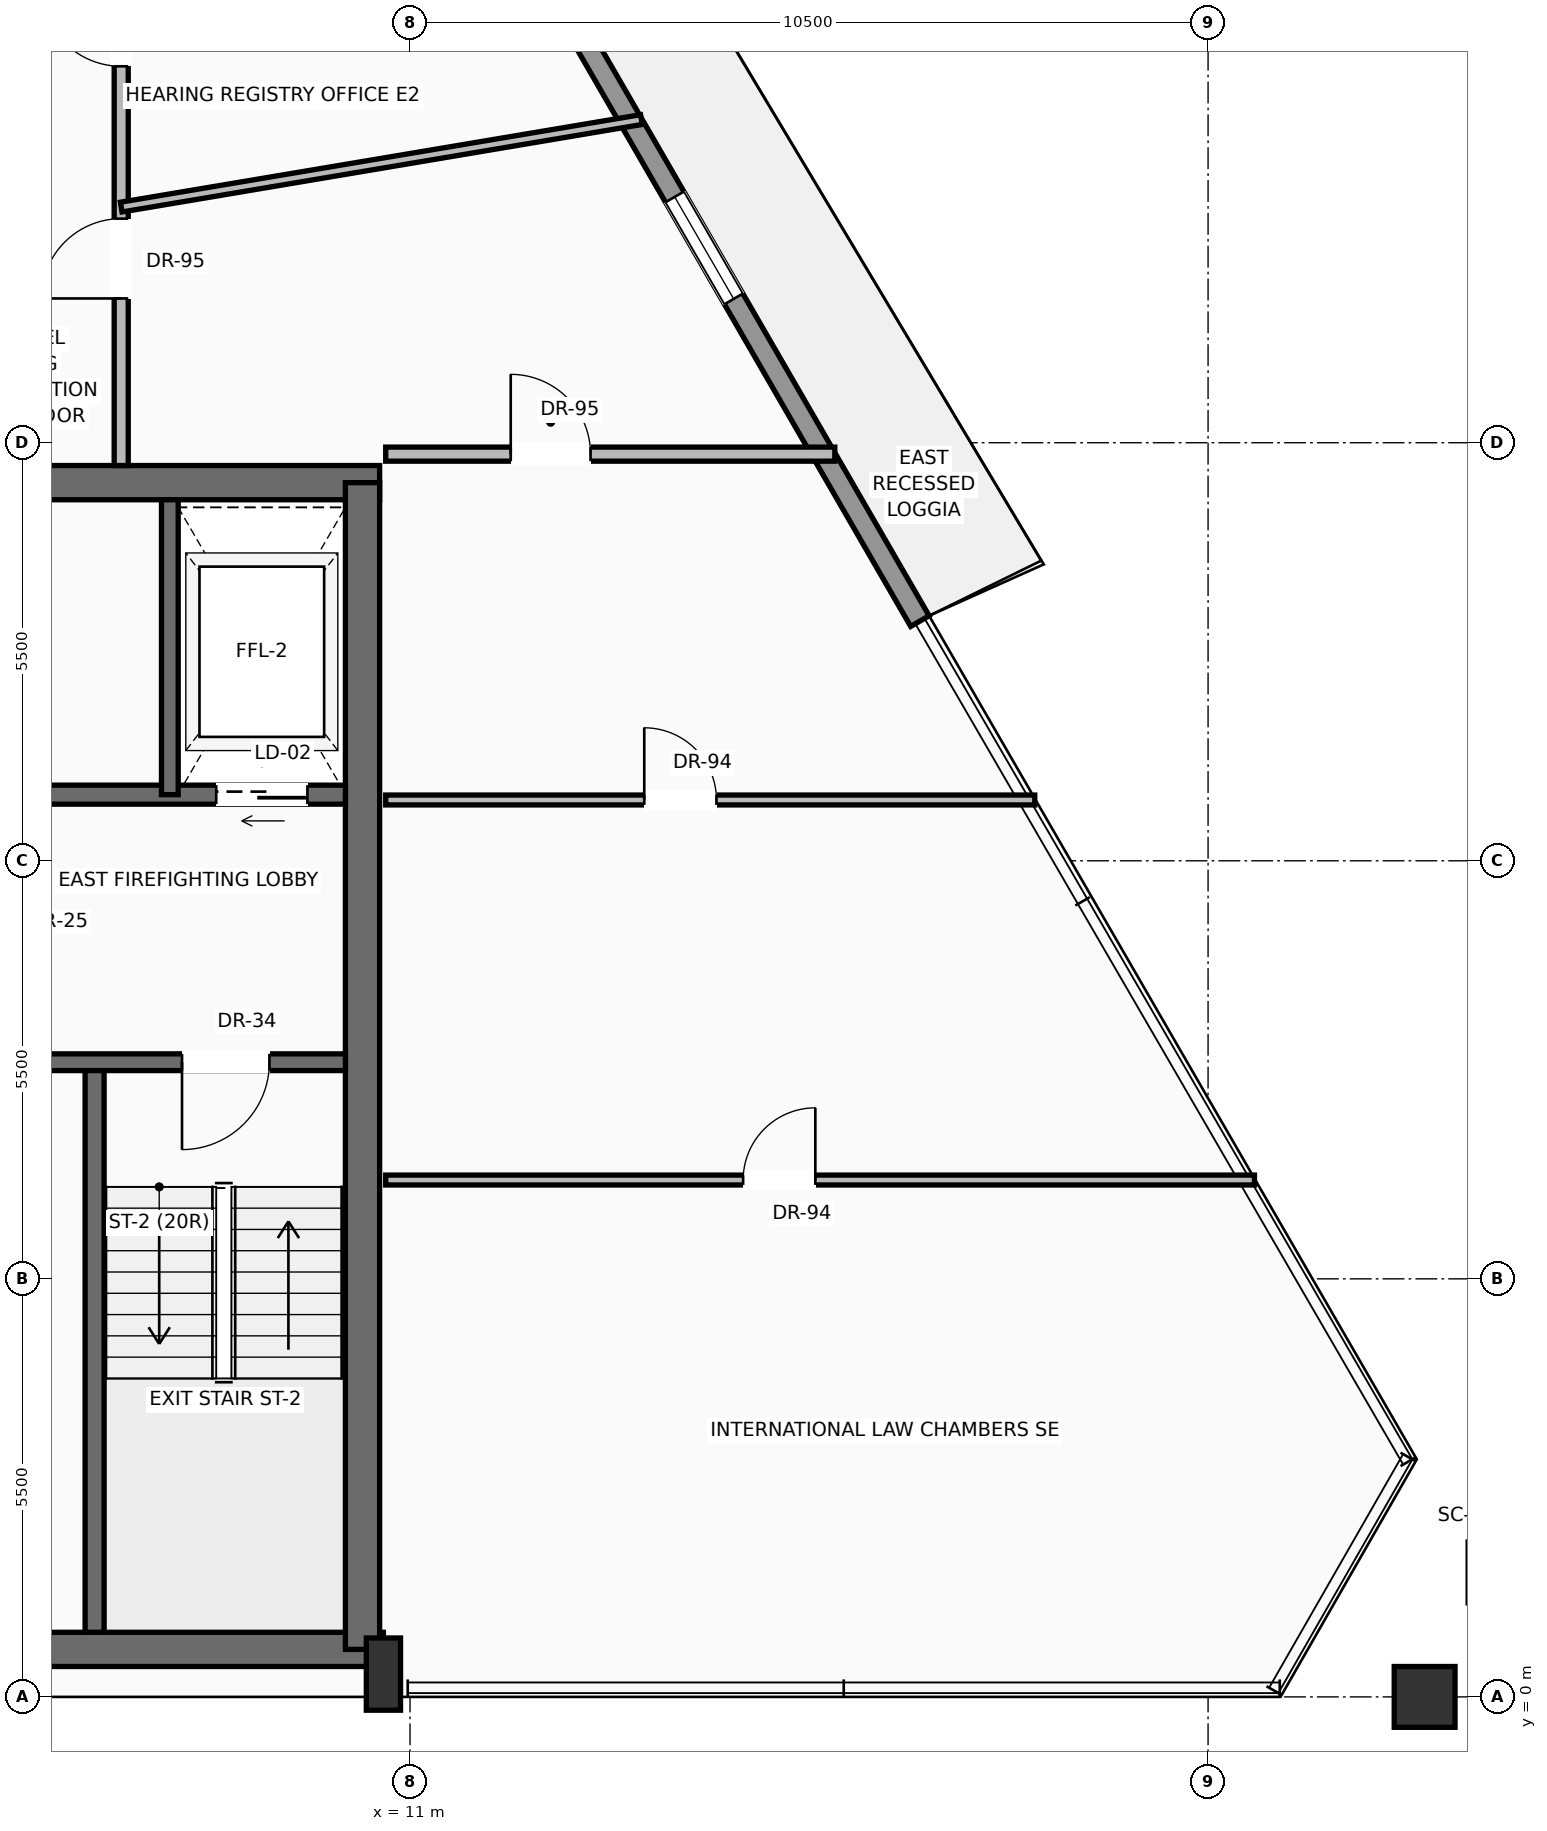
"""IFC4 building model, lengths in metres.
Left out: names, types, materials, properties, quantities, classifications, styles, units other than length and angle.
Written with IfcOpenShell. Run it as: python <this file> out.ifc"""

import sys

from ifc_helpers import new_model, si_unit, direction, frame, frame_2d, origin, origin_2d, place, context, subcontext, project, spatial, rectangle, hollow_rectangle, extrude, source, transform, mapped, element, fill, save


model = new_model("IFC4")
c1 = context("Model", 3, precision=1e-05, world=origin(), true_north=direction((0.0, 1.0)))
c2 = subcontext(c1, "Body", "Model", "MODEL_VIEW")
j1 = project(units=[si_unit("LENGTHUNIT", "METRE"), si_unit("PLANEANGLEUNIT", "RADIAN")], contexts=[c1])
p1 = place(None, origin())
s1 = spatial("IfcSite", under=j1, at=p1, CompositionType="ELEMENT")
p2 = place(p1, origin())
s2 = spatial("IfcBuilding", under=s1, at=p2, CompositionType="ELEMENT")
p3 = place(p2, frame((0.0, 0.0, 293.7)))
s3 = spatial("IfcBuildingStorey", under=s2, at=p3, CompositionType="ELEMENT", Elevation=293.7)
p4 = place(p3, frame((-10.65, 0.625, 0.0), z_axis=(0.0, 0.0, 1.0), x_axis=(1.0, 0.0, 0.0)))
e1 = element("IfcWall", 1, at=p4, inside=s3, PredefinedType="SHEAR", context=c2, shape_type="SweptSolid", body=[
    extrude(rectangle(XDim=21.3, YDim=0.45, at=frame_2d((10.65, 0.0))), origin(), (0.0, 0.0, 1.0), 3.24),
])
p5 = place(p3, frame((-10.6, 15.975, 0.0), z_axis=(0.0, 0.0, 1.0), x_axis=(1.0, 0.0, 0.0)))
e2 = element("IfcWall", 2, at=p5, inside=s3, PredefinedType="SHEAR", context=c2, shape_type="SweptSolid", body=[
    extrude(rectangle(XDim=21.2, YDim=0.45, at=frame_2d((10.6, 0.0))), origin(), (0.0, 0.0, 1.0), 3.24),
])
p6 = place(p5, frame((3.17, 0.0, 0.0)))
e3 = element("IfcOpeningElement", 3, at=p6, cuts=e2, PredefinedType="OPENING", context=c2, shape_type="SweptSolid", body=[
    extrude(rectangle(XDim=1.3, YDim=2.3, at=frame_2d((0.65, 1.15))), frame((0.0, 0.235, 0.0), z_axis=(0.0, -1.0, 0.0), x_axis=(1.0, 0.0, 0.0)), (0.0, 0.0, 1.0), 0.47),
])
p7 = place(p5, frame((9.6, 0.0, 0.0)))
e4 = element("IfcOpeningElement", 4, at=p7, cuts=e2, PredefinedType="OPENING", context=c2, shape_type="SweptSolid", body=[
    extrude(rectangle(XDim=2.0, YDim=2.4, at=frame_2d((1.0, 1.2))), frame((0.0, 0.235, 0.0), z_axis=(0.0, -1.0, 0.0), x_axis=(1.0, 0.0, 0.0)), (0.0, 0.0, 1.0), 0.47),
])
p8 = place(p3, frame((10.375, 0.625, 0.0), z_axis=(0.0, 0.0, 1.0), x_axis=(0.0, 1.0, 0.0)))
e5 = element("IfcWall", 5, at=p8, inside=s3, PredefinedType="SHEAR", context=c2, shape_type="SweptSolid", body=[
    extrude(rectangle(XDim=15.35, YDim=0.45, at=frame_2d((7.675, 0.0))), origin(), (0.0, 0.0, 1.0), 3.24),
])
m1 = source(origin(), c2, "Body", "SweptSolid", [
    extrude(rectangle(XDim=0.45, YDim=0.95, at=origin_2d()), origin(), (0.0, 0.0, 1.0), 3.45),
])
p9 = place(p3, frame((10.65, 0.3, 0.0), z_axis=(0.0, 0.0, 1.0), x_axis=(1.0, 0.0, 0.0)))
e6 = element("IfcColumn", 6, at=p9, inside=s3, PredefinedType="PILASTER", context=c2, shape_type="MappedRepresentation", body=[
    mapped(m1, transform((0.0, 0.0, 0.0), scale=1.0)),
])
m2 = source(origin(), c2, "Body", "SweptSolid", [
    extrude(hollow_rectangle(XDim=0.8, YDim=0.8, WallThickness=0.04, at=origin_2d()), origin(), (0.0, 0.0, 1.0), 3.441),
])
p10 = place(p3, frame((24.349, 0.0, 0.004), z_axis=(-0.004540570433, 0.0, 0.999989691557), x_axis=(0.0, -1.0, 0.0)))
e7 = element("IfcColumn", 7, at=p10, inside=s3, PredefinedType="COLUMN", context=c2, shape_type="MappedRepresentation", body=[
    mapped(m2, transform((0.0, 0.0, 0.0), scale=1.0)),
])
m3 = source(origin(), c2, "Body", "SweptSolid", [
    extrude(hollow_rectangle(XDim=0.8, YDim=0.8, WallThickness=0.04, at=origin_2d()), origin(), (0.0, 0.0, 1.0), 3.442),
])
p11 = place(p3, frame((25.322, 1.637, 0.004), z_axis=(-0.013902679063, -0.015250387748, 0.99978704792), x_axis=(0.739006174576, -0.673698652172, 0.0)))
e8 = element("IfcColumn", 8, at=p11, inside=s3, PredefinedType="COLUMN", context=c2, shape_type="MappedRepresentation", body=[
    mapped(m3, transform((0.0, 0.0, 0.0), scale=1.0)),
])
p12 = place(p3, frame((7.626, 31.593, 0.0), z_axis=(0.0, 0.0, 1.0), x_axis=(0.500533605719, -0.865717107112, 0.0)))
e9 = element("IfcWall", 9, at=p12, inside=s3, PredefinedType="SOLIDWALL", context=c2, shape_type="SweptSolid", body=[
    extrude(rectangle(XDim=20.145, YDim=0.28, at=frame_2d((10.072, 0.0))), origin(), (0.0, 0.0, 1.0), 2.82),
])
p13 = place(p12, frame((4.835, 0.0, 0.0)))
e10 = element("IfcOpeningElement", 10, at=p13, cuts=e9, PredefinedType="OPENING", context=c2, shape_type="SweptSolid", body=[
    extrude(rectangle(XDim=1.6, YDim=2.35, at=frame_2d((0.8, 1.175))), frame((0.0, 0.15, 0.0), z_axis=(0.0, -1.0, 0.0), x_axis=(1.0, 0.0, 0.0)), (0.0, 0.0, 1.0), 0.3),
])
p14 = place(p12, frame((13.698, 0.0, 0.9)))
e11 = element("IfcOpeningElement", 11, at=p14, cuts=e9, PredefinedType="OPENING", context=c2, shape_type="SweptSolid", body=[
    extrude(rectangle(XDim=1.55, YDim=1.75, at=frame_2d((0.775, 0.875))), frame((0.0, 0.15, 0.0), z_axis=(0.0, -1.0, 0.0), x_axis=(1.0, 0.0, 0.0)), (0.0, 0.0, 1.0), 0.3),
])
p15 = place(p3, frame((6.85, 0.85, 0.0), z_axis=(0.0, 0.0, 1.0), x_axis=(0.0, 1.0, 0.0)))
e12 = element("IfcWall", 12, at=p15, inside=s3, PredefinedType="SOLIDWALL", context=c2, shape_type="SweptSolid", body=[
    extrude(rectangle(XDim=7.5, YDim=0.25, at=frame_2d((3.75, 0.0))), origin(), (0.0, 0.0, 1.0), 3.24),
])
p16 = place(p3, frame((10.15, 8.35, 0.0), z_axis=(0.0, 0.0, 1.0), x_axis=(-1.0, 0.0, 0.0)))
e13 = element("IfcWall", 13, at=p16, inside=s3, PredefinedType="SOLIDWALL", context=c2, shape_type="SweptSolid", body=[
    extrude(rectangle(XDim=4.65, YDim=0.22, at=frame_2d((2.325, 0.0))), origin(), (0.0, 0.0, 1.0), 3.24),
])
p17 = place(p16, frame((1.0, 0.0, 0.0)))
e14 = element("IfcOpeningElement", 14, at=p17, cuts=e13, PredefinedType="OPENING", context=c2, shape_type="SweptSolid", body=[
    extrude(rectangle(XDim=1.15, YDim=2.2, at=frame_2d((0.575, 1.1))), frame((0.0, 0.12, 0.0), z_axis=(0.0, -1.0, 0.0), x_axis=(1.0, 0.0, 0.0)), (0.0, 0.0, 1.0), 0.24),
])
p18 = place(p3, frame((10.15, 11.87, 0.0), z_axis=(0.0, 0.0, 1.0), x_axis=(-1.0, 0.0, 0.0)))
e15 = element("IfcWall", 15, at=p18, inside=s3, PredefinedType="SOLIDWALL", context=c2, shape_type="SweptSolid", body=[
    extrude(rectangle(XDim=4.65, YDim=0.25, at=frame_2d((2.325, 0.0))), origin(), (0.0, 0.0, 1.0), 3.24),
])
p19 = place(p18, frame((0.5, 0.0, 0.0)))
e16 = element("IfcOpeningElement", 16, at=p19, cuts=e15, PredefinedType="OPENING", context=c2, shape_type="SweptSolid", body=[
    extrude(rectangle(XDim=1.2, YDim=2.25, at=frame_2d((0.6, 1.125))), frame((0.0, 0.135, 0.0), z_axis=(0.0, -1.0, 0.0), x_axis=(1.0, 0.0, 0.0)), (0.0, 0.0, 1.0), 0.27),
])
p20 = place(p3, frame((7.84, 11.87, 0.0), z_axis=(0.0, 0.0, 1.0), x_axis=(0.0, 1.0, 0.0)))
e17 = element("IfcWall", 17, at=p20, inside=s3, PredefinedType="SOLIDWALL", context=c2, shape_type="SweptSolid", body=[
    extrude(rectangle(XDim=3.88, YDim=0.22, at=frame_2d((1.94, 0.0))), origin(), (0.0, 0.0, 1.0), 3.24),
])
p21 = place(p3, frame((7.2, 16.2, 0.0), z_axis=(0.0, 0.0, 1.0), x_axis=(0.0, 1.0, 0.0)))
e18 = element("IfcWall", 18, at=p21, inside=s3, PredefinedType="PARTITIONING", context=c2, shape_type="SweptSolid", body=[
    extrude(rectangle(XDim=10.4, YDim=0.185, at=frame_2d((5.2, 0.0))), origin(), (0.0, 0.0, 1.0), 3.232),
])
p22 = place(p21, frame((2.198, 0.0, 0.0)))
e19 = element("IfcOpeningElement", 19, at=p22, cuts=e18, PredefinedType="OPENING", context=c2, shape_type="SweptSolid", body=[
    extrude(rectangle(XDim=1.05, YDim=2.25, at=frame_2d((0.525, 1.125))), frame((0.0, 0.103, 0.0), z_axis=(0.0, -1.0, 0.0), x_axis=(1.0, 0.0, 0.0)), (0.0, 0.0, 1.0), 0.205),
])
p23 = place(p21, frame((5.252, 0.0, 0.0)))
e20 = element("IfcOpeningElement", 20, at=p23, cuts=e18, PredefinedType="OPENING", context=c2, shape_type="SweptSolid", body=[
    extrude(rectangle(XDim=1.05, YDim=2.25, at=frame_2d((0.525, 1.125))), frame((0.0, 0.103, 0.0), z_axis=(0.0, -1.0, 0.0), x_axis=(1.0, 0.0, 0.0)), (0.0, 0.0, 1.0), 0.205),
])
p24 = place(p21, frame((8.369, 0.0, 0.0)))
e21 = element("IfcOpeningElement", 21, at=p24, cuts=e18, PredefinedType="OPENING", context=c2, shape_type="SweptSolid", body=[
    extrude(rectangle(XDim=1.05, YDim=2.25, at=frame_2d((0.525, 1.125))), frame((0.0, 0.103, 0.0), z_axis=(0.0, -1.0, 0.0), x_axis=(1.0, 0.0, 0.0)), (0.0, 0.0, 1.0), 0.205),
])
p25 = place(p3, frame((10.68, 16.35, 0.0), z_axis=(0.0, 0.0, 1.0), x_axis=(1.0, 0.0, 0.0)))
e22 = element("IfcWall", 22, at=p25, inside=s3, PredefinedType="PARTITIONING", context=c2, shape_type="SweptSolid", body=[
    extrude(rectangle(XDim=5.909, YDim=0.185, at=frame_2d((2.955, 0.0))), origin(), (0.0, 0.0, 1.0), 3.232),
])
p26 = place(p25, frame((1.645, 0.0, 0.0)))
e23 = element("IfcOpeningElement", 23, at=p26, cuts=e22, PredefinedType="OPENING", context=c2, shape_type="SweptSolid", body=[
    extrude(rectangle(XDim=1.05, YDim=2.25, at=frame_2d((0.525, 1.125))), frame((0.0, 0.103, 0.0), z_axis=(0.0, -1.0, 0.0), x_axis=(1.0, 0.0, 0.0)), (0.0, 0.0, 1.0), 0.205),
])
p27 = place(p3, frame((10.68, 6.8, 0.0), z_axis=(0.0, 0.0, 1.0), x_axis=(1.0, 0.0, 0.0)))
e24 = element("IfcWall", 24, at=p27, inside=s3, PredefinedType="PARTITIONING", context=c2, shape_type="SweptSolid", body=[
    extrude(rectangle(XDim=11.43, YDim=0.13, at=frame_2d((5.715, 0.0))), origin(), (0.0, 0.0, 1.0), 3.232),
])
p28 = place(p27, frame((4.703, 0.0, 0.0)))
e25 = element("IfcOpeningElement", 25, at=p28, cuts=e24, PredefinedType="OPENING", context=c2, shape_type="SweptSolid", body=[
    extrude(rectangle(XDim=0.95, YDim=2.2, at=frame_2d((0.475, 1.1))), frame((0.0, 0.075, 0.0), z_axis=(0.0, -1.0, 0.0), x_axis=(1.0, 0.0, 0.0)), (0.0, 0.0, 1.0), 0.15),
])
p29 = place(p3, frame((10.68, 11.8, 0.0), z_axis=(0.0, 0.0, 1.0), x_axis=(1.0, 0.0, 0.0)))
e26 = element("IfcWall", 26, at=p29, inside=s3, PredefinedType="PARTITIONING", context=c2, shape_type="SweptSolid", body=[
    extrude(rectangle(XDim=8.54, YDim=0.13, at=frame_2d((4.27, 0.0))), origin(), (0.0, 0.0, 1.0), 3.232),
])
p30 = place(p29, frame((3.402, 0.0, 0.0)))
e27 = element("IfcOpeningElement", 27, at=p30, cuts=e26, PredefinedType="OPENING", context=c2, shape_type="SweptSolid", body=[
    extrude(rectangle(XDim=0.95, YDim=2.2, at=frame_2d((0.475, 1.1))), frame((0.0, 0.075, 0.0), z_axis=(0.0, -1.0, 0.0), x_axis=(1.0, 0.0, 0.0)), (0.0, 0.0, 1.0), 0.15),
])
p31 = place(p3, frame((7.2, 19.6, 0.0), z_axis=(0.0, 0.0, 1.0), x_axis=(0.986143702521, 0.165893333134, 0.0)))
e28 = element("IfcWall", 28, at=p31, inside=s3, PredefinedType="PARTITIONING", context=c2, shape_type="SweptSolid", body=[
    extrude(rectangle(XDim=6.94, YDim=0.13, at=frame_2d((3.47, 0.0))), origin(), (0.0, 0.0, 1.0), 2.885),
])
m4 = source(origin(), c2, "Body", "SweptSolid", [
    extrude(rectangle(XDim=1.55, YDim=1.75, at=frame_2d((0.775, 0.875))), frame((0.0, 0.03, 0.0), z_axis=(0.0, -1.0, 0.0), x_axis=(1.0, 0.0, 0.0)), (0.0, 0.0, 1.0), 0.06),
])
p32 = place(p14, origin())
e29 = element("IfcWindow", 29, at=p32, inside=s3, PartitioningType="SINGLE_PANEL", PredefinedType="WINDOW", context=c2, shape_type="MappedRepresentation", body=[
    mapped(m4, transform((0.0, 0.0, 0.0), scale=1.0)),
])
fill(e11, e29)
m5 = source(origin(), c2, "Body", "SweptSolid", [
    extrude(rectangle(XDim=1.15, YDim=2.2, at=frame_2d((0.575, 1.1))), frame((0.0, 0.025, 0.0), z_axis=(0.0, -1.0, 0.0), x_axis=(1.0, 0.0, 0.0)), (0.0, 0.0, 1.0), 0.05),
])
p33 = place(p17, origin())
e30 = element("IfcDoor", 30, at=p33, inside=s3, OperationType="SINGLE_SWING_RIGHT", PredefinedType="DOOR", context=c2, shape_type="MappedRepresentation", body=[
    mapped(m5, transform((0.0, 0.0, 0.0), scale=1.0)),
])
fill(e14, e30)
m6 = source(origin(), c2, "Body", "SweptSolid", [
    extrude(rectangle(XDim=1.2, YDim=2.25, at=frame_2d((0.6, 1.125))), frame((0.0, 0.025, 0.0), z_axis=(0.0, -1.0, 0.0), x_axis=(1.0, 0.0, 0.0)), (0.0, 0.0, 1.0), 0.05),
])
p34 = place(p19, origin())
e31 = element("IfcDoor", 31, at=p34, inside=s3, OperationType="SLIDING_TO_RIGHT", PredefinedType="DOOR", context=c2, shape_type="MappedRepresentation", body=[
    mapped(m6, transform((0.0, 0.0, 0.0), scale=1.0)),
])
fill(e16, e31)
m7 = source(origin(), c2, "Body", "SweptSolid", [
    extrude(rectangle(XDim=1.05, YDim=2.25, at=frame_2d((0.525, 1.125))), frame((0.0, 0.025, 0.0), z_axis=(0.0, -1.0, 0.0), x_axis=(1.0, 0.0, 0.0)), (0.0, 0.0, 1.0), 0.05),
])
p35 = place(p26, origin())
e32 = element("IfcDoor", 32, at=p35, inside=s3, OperationType="SINGLE_SWING_LEFT", PredefinedType="DOOR", context=c2, shape_type="MappedRepresentation", body=[
    mapped(m7, transform((0.0, 0.0, 0.0), scale=1.0)),
])
fill(e23, e32)
m8 = source(origin(), c2, "Body", "SweptSolid", [
    extrude(rectangle(XDim=0.95, YDim=2.2, at=frame_2d((0.475, 1.1))), frame((0.0, 0.025, 0.0), z_axis=(0.0, -1.0, 0.0), x_axis=(1.0, 0.0, 0.0)), (0.0, 0.0, 1.0), 0.05),
])
p36 = place(p28, origin())
e33 = element("IfcDoor", 33, at=p36, inside=s3, OperationType="SINGLE_SWING_RIGHT", PredefinedType="DOOR", context=c2, shape_type="MappedRepresentation", body=[
    mapped(m8, transform((0.0, 0.0, 0.0), scale=1.0)),
])
fill(e25, e33)
p37 = place(p30, origin())
e34 = element("IfcDoor", 34, at=p37, inside=s3, OperationType="SINGLE_SWING_LEFT", PredefinedType="DOOR", context=c2, shape_type="MappedRepresentation", body=[
    mapped(m8, transform((0.0, 0.0, 0.0), scale=1.0)),
])
fill(e27, e34)
p38 = place(p22, origin())
e35 = element("IfcDoor", 35, at=p38, inside=s3, OperationType="SINGLE_SWING_LEFT", PredefinedType="DOOR", context=c2, shape_type="MappedRepresentation", body=[
    mapped(m7, transform((0.0, 0.0, 0.0), scale=1.0)),
])
fill(e19, e35)
p39 = place(p23, origin())
e36 = element("IfcDoor", 36, at=p39, inside=s3, OperationType="SINGLE_SWING_RIGHT", PredefinedType="DOOR", context=c2, shape_type="MappedRepresentation", body=[
    mapped(m7, transform((0.0, 0.0, 0.0), scale=1.0)),
])
fill(e20, e36)
save(model, sys.argv[1])
